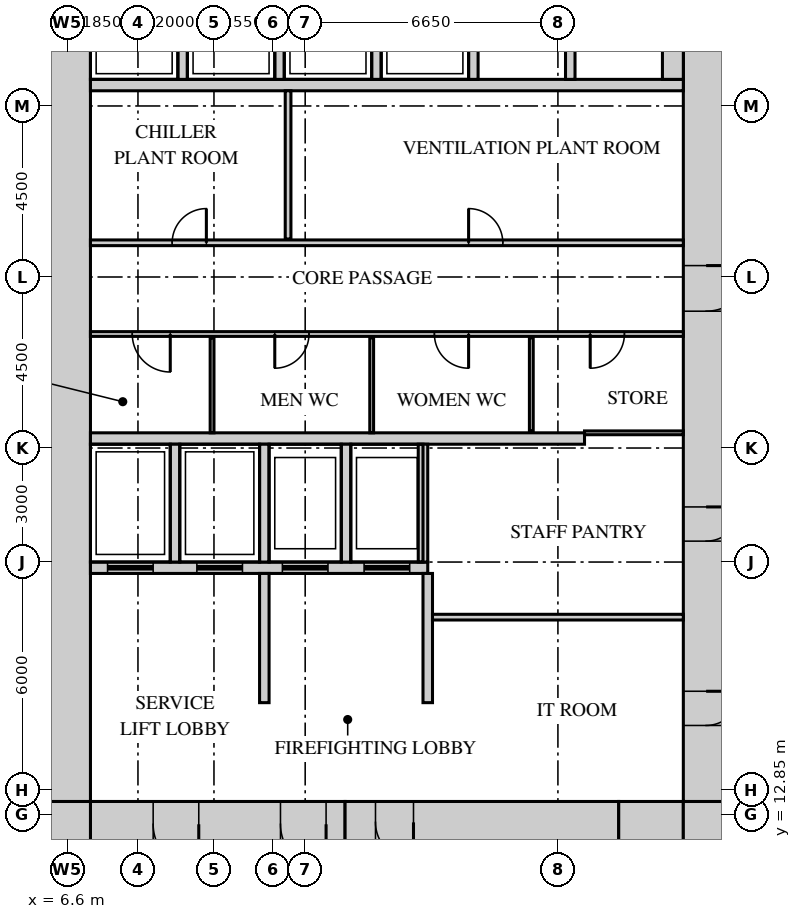
"""IFC4 building model, lengths in metres.
Left out: names, types, materials, properties, quantities, classifications, styles, units other than length and angle.
Written with IfcOpenShell. Run it as: python <this file> out.ifc"""

import sys

from ifc_helpers import new_model, si_unit, direction, frame, frame_2d, origin, place, context, subcontext, project, spatial, rectangle, extrude, source, transform, mapped, element, fill, save


model = new_model("IFC4")
c1 = context("Model", 3, precision=1e-05, world=origin(), true_north=direction((0.0, 1.0)))
c2 = subcontext(c1, "Body", "Model", "MODEL_VIEW")
j1 = project(units=[si_unit("LENGTHUNIT", "METRE"), si_unit("PLANEANGLEUNIT", "RADIAN")], contexts=[c1])
p1 = place(None, origin())
s1 = spatial("IfcSite", under=j1, at=p1, CompositionType="ELEMENT")
p2 = place(p1, origin())
s2 = spatial("IfcBuilding", under=s1, at=p2, CompositionType="ELEMENT")
p3 = place(p2, frame((0.0, 0.0, 23.5)))
s3 = spatial("IfcBuildingStorey", under=s2, at=p3, CompositionType="ELEMENT", Elevation=23.5)
m1 = source(origin(), c2, "Body", "SweptSolid", [
    extrude(rectangle(XDim=6.7, YDim=1.2, at=frame_2d((3.35, 0.0))), origin(), (0.0, 0.0, 1.0), 4.7),
])
p4 = place(p3, frame((7.2, 12.6, 0.0), z_axis=(0.0, 0.0, 1.0), x_axis=(1.0, 0.0, 0.0)))
e1 = element("IfcWall", 1, at=p4, inside=s3, PredefinedType="SHEAR", context=c2, shape_type="MappedRepresentation", body=[
    mapped(m1, transform((0.0, 0.0, 0.0))),
])
m2 = source(origin(), c2, "Body", "SweptSolid", [
    extrude(rectangle(XDim=1.2, YDim=2.1, at=frame_2d((0.6, 1.05))), frame((0.0, 0.61, 0.0), z_axis=(0.0, -1.0, 0.0), x_axis=(1.0, 0.0, 0.0)), (0.0, 0.0, 1.0), 1.22),
])
p5 = place(p4, frame((5.0, 0.0, 0.0)))
e2 = element("IfcOpeningElement", 2, at=p5, cuts=e1, PredefinedType="OPENING", context=c2, shape_type="MappedRepresentation", body=[
    mapped(m2, transform((0.0, 0.0, 0.0))),
])
p6 = place(p4, frame((1.65, 0.0, 0.0)))
e3 = element("IfcOpeningElement", 3, at=p6, cuts=e1, PredefinedType="OPENING", context=c2, shape_type="MappedRepresentation", body=[
    mapped(m2, transform((0.0, 0.0, 0.0))),
])
m3 = source(origin(), c2, "Body", "SweptSolid", [
    extrude(rectangle(XDim=7.2, YDim=1.1, at=frame_2d((3.6, 0.0))), origin(), (0.0, 0.0, 1.0), 4.7),
])
p7 = place(p3, frame((13.9, 12.65, 0.0), z_axis=(0.0, 0.0, 1.0), x_axis=(1.0, 0.0, 0.0)))
e4 = element("IfcWall", 4, at=p7, inside=s3, PredefinedType="SHEAR", context=c2, shape_type="MappedRepresentation", body=[
    mapped(m3, transform((0.0, 0.0, 0.0))),
])
m4 = source(origin(), c2, "Body", "SweptSolid", [
    extrude(rectangle(XDim=1.0, YDim=2.1, at=frame_2d((0.5, 1.05))), frame((0.0, 0.56, 0.0), z_axis=(0.0, -1.0, 0.0), x_axis=(1.0, 0.0, 0.0)), (0.0, 0.0, 1.0), 1.12),
])
p8 = place(p7, frame((0.8, 0.0, 0.0)))
e5 = element("IfcOpeningElement", 5, at=p8, cuts=e4, PredefinedType="OPENING", context=c2, shape_type="MappedRepresentation", body=[
    mapped(m4, transform((0.0, 0.0, 0.0))),
])
m5 = source(origin(), c2, "Body", "SweptSolid", [
    extrude(rectangle(XDim=1.7, YDim=1.2, at=frame_2d((0.85, 0.0))), origin(), (0.0, 0.0, 1.0), 4.7),
])
p9 = place(p3, frame((21.1, 12.6, 0.0), z_axis=(0.0, 0.0, 1.0), x_axis=(1.0, 0.0, 0.0)))
e6 = element("IfcWall", 6, at=p9, inside=s3, PredefinedType="SHEAR", context=c2, shape_type="MappedRepresentation", body=[
    mapped(m5, transform((0.0, 0.0, 0.0))),
])
m6 = source(origin(), c2, "Body", "SweptSolid", [
    extrude(rectangle(XDim=1.2, YDim=1.2, at=frame_2d((0.6, 0.0))), origin(), (0.0, 0.0, 1.0), 4.7),
])
for number, where, z_axis, x_axis in (
    (7, (22.8, 12.6, 0.0), (0.0, 0.0, 1.0), (1.0, 0.0, 0.0)),
    (8, (6.0, 12.6, 0.0), (0.0, 0.0, 1.0), (1.0, 0.0, 0.0)),
):
    element("IfcWall", number, at=place(p3, frame(where, z_axis=z_axis, x_axis=x_axis)), inside=s3, PredefinedType="SHEAR", context=c2, shape_type="MappedRepresentation", body=[
        mapped(m6, transform((0.0, 0.0, 0.0))),
    ])
m7 = source(origin(), c2, "Body", "SweptSolid", [
    extrude(rectangle(XDim=27.6, YDim=1.2, at=frame_2d((13.8, 0.0))), origin(), (0.0, 0.0, 1.0), 4.7),
])
p10 = place(p3, frame((23.4, 13.2, 0.0), z_axis=(0.0, 0.0, 1.0), x_axis=(0.0, 1.0, 0.0)))
e9 = element("IfcWall", 9, at=p10, inside=s3, PredefinedType="SHEAR", context=c2, shape_type="MappedRepresentation", body=[
    mapped(m7, transform((0.0, 0.0, 0.0))),
])
m8 = source(origin(), c2, "Body", "SweptSolid", [
    extrude(rectangle(XDim=1.8, YDim=2.1, at=frame_2d((0.9, 1.05))), frame((0.0, 0.61, 0.0), z_axis=(0.0, -1.0, 0.0), x_axis=(1.0, 0.0, 0.0)), (0.0, 0.0, 1.0), 1.22),
])
p11 = place(p10, frame((22.4, 0.0, 0.0)))
e10 = element("IfcOpeningElement", 10, at=p11, cuts=e9, PredefinedType="OPENING", context=c2, shape_type="MappedRepresentation", body=[
    mapped(m8, transform((0.0, 0.0, 0.0))),
])
p12 = place(p10, frame((12.9, 0.0, 0.0)))
e11 = element("IfcOpeningElement", 11, at=p12, cuts=e9, PredefinedType="OPENING", context=c2, shape_type="MappedRepresentation", body=[
    mapped(m2, transform((0.0, 0.0, 0.0))),
])
m9 = source(origin(), c2, "Body", "SweptSolid", [
    extrude(rectangle(XDim=0.9, YDim=2.1, at=frame_2d((0.45, 1.05))), frame((0.0, 0.61, 0.0), z_axis=(0.0, -1.0, 0.0), x_axis=(1.0, 0.0, 0.0)), (0.0, 0.0, 1.0), 1.22),
])
p13 = place(p10, frame((2.0, 0.0, 0.0)))
e12 = element("IfcOpeningElement", 12, at=p13, cuts=e9, PredefinedType="OPENING", context=c2, shape_type="MappedRepresentation", body=[
    mapped(m9, transform((0.0, 0.0, 0.0))),
])
p14 = place(p10, frame((6.85, 0.0, 0.0)))
e13 = element("IfcOpeningElement", 13, at=p14, cuts=e9, PredefinedType="OPENING", context=c2, shape_type="MappedRepresentation", body=[
    mapped(m9, transform((0.0, 0.0, 0.0))),
])
p15 = place(p3, frame((6.6, 13.2, 0.0), z_axis=(0.0, 0.0, 1.0), x_axis=(0.0, 1.0, 0.0)))
e14 = element("IfcWall", 14, at=p15, inside=s3, PredefinedType="SHEAR", context=c2, shape_type="MappedRepresentation", body=[
    mapped(m7, transform((0.0, 0.0, 0.0))),
])
m10 = source(origin(), c2, "Body", "SweptSolid", [
    extrude(rectangle(XDim=13.0, YDim=0.3, at=frame_2d((6.5, 0.0))), origin(), (0.0, 0.0, 1.0), 4.7),
])
p16 = place(p3, frame((7.2, 22.75, 0.0), z_axis=(0.0, 0.0, 1.0), x_axis=(1.0, 0.0, 0.0)))
e15 = element("IfcWall", 15, at=p16, inside=s3, PredefinedType="STANDARD", context=c2, shape_type="MappedRepresentation", body=[
    mapped(m10, transform((0.0, 0.0, 0.0))),
])
m11 = source(origin(), c2, "Body", "SweptSolid", [
    extrude(rectangle(XDim=8.875, YDim=0.3, at=frame_2d((4.438, 0.0))), origin(), (0.0, 0.0, 1.0), 4.7),
])
p17 = place(p3, frame((7.2, 19.35, 0.0), z_axis=(0.0, 0.0, 1.0), x_axis=(1.0, 0.0, 0.0)))
e16 = element("IfcWall", 16, at=p17, inside=s3, PredefinedType="STANDARD", context=c2, shape_type="MappedRepresentation", body=[
    mapped(m11, transform((0.0, 0.0, 0.0))),
])
m12 = source(origin(), c2, "Body", "SweptSolid", [
    extrude(rectangle(XDim=1.2, YDim=2.1, at=frame_2d((0.6, 1.05))), frame((0.0, 0.16, 0.0), z_axis=(0.0, -1.0, 0.0), x_axis=(1.0, 0.0, 0.0)), (0.0, 0.0, 1.0), 0.32),
])
p18 = place(p17, frame((0.45, 0.0, 0.0)))
e17 = element("IfcOpeningElement", 17, at=p18, cuts=e16, PredefinedType="OPENING", context=c2, shape_type="MappedRepresentation", body=[
    mapped(m12, transform((0.0, 0.0, 0.0))),
])
p19 = place(p17, frame((2.8, 0.0, 0.0)))
e18 = element("IfcOpeningElement", 18, at=p19, cuts=e16, PredefinedType="OPENING", context=c2, shape_type="MappedRepresentation", body=[
    mapped(m12, transform((0.0, 0.0, 0.0))),
])
p20 = place(p17, frame((5.05, 0.0, 0.0)))
e19 = element("IfcOpeningElement", 19, at=p20, cuts=e16, PredefinedType="OPENING", context=c2, shape_type="MappedRepresentation", body=[
    mapped(m12, transform((0.0, 0.0, 0.0))),
])
p21 = place(p17, frame((7.2, 0.0, 0.0)))
e20 = element("IfcOpeningElement", 20, at=p21, cuts=e16, PredefinedType="OPENING", context=c2, shape_type="MappedRepresentation", body=[
    mapped(m12, transform((0.0, 0.0, 0.0))),
])
m13 = source(origin(), c2, "Body", "SweptSolid", [
    extrude(rectangle(XDim=15.6, YDim=0.3, at=frame_2d((7.8, 0.0))), origin(), (0.0, 0.0, 1.0), 4.7),
])
p22 = place(p3, frame((7.2, 32.05, 0.0), z_axis=(0.0, 0.0, 1.0), x_axis=(1.0, 0.0, 0.0)))
e21 = element("IfcWall", 21, at=p22, inside=s3, PredefinedType="STANDARD", context=c2, shape_type="MappedRepresentation", body=[
    mapped(m13, transform((0.0, 0.0, 0.0))),
])
m14 = source(origin(), c2, "Body", "SweptSolid", [
    extrude(rectangle(XDim=3.1, YDim=0.25, at=frame_2d((1.55, 0.0))), origin(), (0.0, 0.0, 1.0), 4.7),
])
for number, where, z_axis, x_axis in (
    (22, (9.425, 19.5, 0.0), (0.0, 0.0, 1.0), (0.0, 1.0, 0.0)),
    (23, (11.775, 19.5, 0.0), (0.0, 0.0, 1.0), (0.0, 1.0, 0.0)),
    (24, (13.925, 19.5, 0.0), (0.0, 0.0, 1.0), (0.0, 1.0, 0.0)),
    (25, (15.95, 19.5, 0.0), (0.0, 0.0, 1.0), (0.0, 1.0, 0.0)),
):
    element("IfcWall", number, at=place(p3, frame(where, z_axis=z_axis, x_axis=x_axis)), inside=s3, PredefinedType="STANDARD", context=c2, shape_type="MappedRepresentation", body=[
        mapped(m14, transform((0.0, 0.0, 0.0))),
    ])
m15 = source(origin(), c2, "Body", "SweptSolid", [
    extrude(rectangle(XDim=2.4, YDim=0.25, at=frame_2d((1.2, 0.0))), origin(), (0.0, 0.0, 1.0), 4.7),
])
for number, where, z_axis, x_axis in (
    (26, (9.625, 32.2, 0.0), (0.0, 0.0, 1.0), (0.0, 1.0, 0.0)),
    (27, (12.175, 32.2, 0.0), (0.0, 0.0, 1.0), (0.0, 1.0, 0.0)),
    (28, (14.725, 32.2, 0.0), (0.0, 0.0, 1.0), (0.0, 1.0, 0.0)),
    (29, (17.275, 32.2, 0.0), (0.0, 0.0, 1.0), (0.0, 1.0, 0.0)),
    (30, (19.825, 32.2, 0.0), (0.0, 0.0, 1.0), (0.0, 1.0, 0.0)),
):
    element("IfcWall", number, at=place(p3, frame(where, z_axis=z_axis, x_axis=x_axis)), inside=s3, PredefinedType="STANDARD", context=c2, shape_type="MappedRepresentation", body=[
        mapped(m15, transform((0.0, 0.0, 0.0))),
    ])
m16 = source(origin(), c2, "Body", "SweptSolid", [
    extrude(rectangle(XDim=2.4, YDim=0.55, at=frame_2d((1.2, 0.0))), origin(), (0.0, 0.0, 1.0), 4.7),
])
p23 = place(p3, frame((22.525, 32.2, 0.0), z_axis=(0.0, 0.0, 1.0), x_axis=(0.0, 1.0, 0.0)))
e31 = element("IfcWall", 31, at=p23, inside=s3, PredefinedType="STANDARD", context=c2, shape_type="MappedRepresentation", body=[
    mapped(m16, transform((0.0, 0.0, 0.0))),
])
m17 = source(origin(), c2, "Body", "SweptSolid", [
    extrude(rectangle(XDim=3.4, YDim=0.25, at=frame_2d((1.7, 0.0))), origin(), (0.0, 0.0, 1.0), 4.7),
])
for number, where, z_axis, x_axis in (
    (32, (16.075, 15.8, 0.0), (0.0, 0.0, 1.0), (0.0, 1.0, 0.0)),
    (33, (11.775, 15.8, 0.0), (0.0, 0.0, 1.0), (0.0, 1.0, 0.0)),
):
    element("IfcWall", number, at=place(p3, frame(where, z_axis=z_axis, x_axis=x_axis)), inside=s3, PredefinedType="STANDARD", context=c2, shape_type="MappedRepresentation", body=[
        mapped(m17, transform((0.0, 0.0, 0.0))),
    ])
m18 = source(origin(), c2, "Body", "SweptSolid", [
    extrude(rectangle(XDim=6.6, YDim=0.15, at=frame_2d((3.3, 0.0))), origin(), (0.0, 0.0, 1.0), 4.7),
])
p24 = place(p3, frame((16.2, 18.05, 0.0), z_axis=(0.0, 0.0, 1.0), x_axis=(1.0, 0.0, 0.0)))
e34 = element("IfcWall", 34, at=p24, inside=s3, PredefinedType="PARTITIONING", context=c2, shape_type="MappedRepresentation", body=[
    mapped(m18, transform((0.0, 0.0, 0.0))),
])
m19 = source(origin(), c2, "Body", "SweptSolid", [
    extrude(rectangle(XDim=2.5, YDim=0.1, at=frame_2d((1.25, 0.0))), origin(), (0.0, 0.0, 1.0), 4.7),
])
for number, where, z_axis, x_axis in (
    (35, (10.4, 22.9, 0.0), (0.0, 0.0, 1.0), (0.0, 1.0, 0.0)),
    (36, (14.6, 22.9, 0.0), (0.0, 0.0, 1.0), (0.0, 1.0, 0.0)),
):
    element("IfcWall", number, at=place(p3, frame(where, z_axis=z_axis, x_axis=x_axis)), inside=s3, PredefinedType="PARTITIONING", context=c2, shape_type="MappedRepresentation", body=[
        mapped(m19, transform((0.0, 0.0, 0.0))),
    ])
m20 = source(origin(), c2, "Body", "SweptSolid", [
    extrude(rectangle(XDim=2.6, YDim=0.1, at=frame_2d((1.3, 0.0))), origin(), (0.0, 0.0, 1.0), 4.7),
])
p25 = place(p3, frame((20.2, 22.9, 0.0), z_axis=(0.0, 0.0, 1.0), x_axis=(1.0, 0.0, 0.0)))
e37 = element("IfcWall", 37, at=p25, inside=s3, PredefinedType="PARTITIONING", context=c2, shape_type="MappedRepresentation", body=[
    mapped(m20, transform((0.0, 0.0, 0.0))),
])
m21 = source(origin(), c2, "Body", "SweptSolid", [
    extrude(rectangle(XDim=2.45, YDim=0.1, at=frame_2d((1.225, 0.0))), origin(), (0.0, 0.0, 1.0), 4.7),
])
p26 = place(p3, frame((18.8, 22.95, 0.0), z_axis=(0.0, 0.0, 1.0), x_axis=(0.0, 1.0, 0.0)))
e38 = element("IfcWall", 38, at=p26, inside=s3, PredefinedType="PARTITIONING", context=c2, shape_type="MappedRepresentation", body=[
    mapped(m21, transform((0.0, 0.0, 0.0))),
])
m22 = source(origin(), c2, "Body", "SweptSolid", [
    extrude(rectangle(XDim=15.6, YDim=0.125, at=frame_2d((7.8, 0.0))), origin(), (0.0, 0.0, 1.0), 4.7),
])
p27 = place(p3, frame((7.2, 25.5, 0.0), z_axis=(0.0, 0.0, 1.0), x_axis=(1.0, 0.0, 0.0)))
e39 = element("IfcWall", 39, at=p27, inside=s3, PredefinedType="PARTITIONING", context=c2, shape_type="MappedRepresentation", body=[
    mapped(m22, transform((0.0, 0.0, 0.0))),
])
m23 = source(origin(), c2, "Body", "SweptSolid", [
    extrude(rectangle(XDim=1.0, YDim=2.1, at=frame_2d((0.5, 1.05))), frame((0.0, 0.073, 0.0), z_axis=(0.0, -1.0, 0.0), x_axis=(1.0, 0.0, 0.0)), (0.0, 0.0, 1.0), 0.145),
])
p28 = place(p27, frame((1.1, 0.0, 0.0)))
e40 = element("IfcOpeningElement", 40, at=p28, cuts=e39, PredefinedType="OPENING", context=c2, shape_type="MappedRepresentation", body=[
    mapped(m23, transform((0.0, 0.0, 0.0))),
])
m24 = source(origin(), c2, "Body", "SweptSolid", [
    extrude(rectangle(XDim=0.9, YDim=2.1, at=frame_2d((0.45, 1.05))), frame((0.0, 0.073, 0.0), z_axis=(0.0, -1.0, 0.0), x_axis=(1.0, 0.0, 0.0)), (0.0, 0.0, 1.0), 0.145),
])
p29 = place(p27, frame((4.85, 0.0, 0.0)))
e41 = element("IfcOpeningElement", 41, at=p29, cuts=e39, PredefinedType="OPENING", context=c2, shape_type="MappedRepresentation", body=[
    mapped(m24, transform((0.0, 0.0, 0.0))),
])
p30 = place(p27, frame((9.05, 0.0, 0.0)))
e42 = element("IfcOpeningElement", 42, at=p30, cuts=e39, PredefinedType="OPENING", context=c2, shape_type="MappedRepresentation", body=[
    mapped(m24, transform((0.0, 0.0, 0.0))),
])
p31 = place(p27, frame((13.15, 0.0, 0.0)))
e43 = element("IfcOpeningElement", 43, at=p31, cuts=e39, PredefinedType="OPENING", context=c2, shape_type="MappedRepresentation", body=[
    mapped(m24, transform((0.0, 0.0, 0.0))),
])
m25 = source(origin(), c2, "Body", "SweptSolid", [
    extrude(rectangle(XDim=15.6, YDim=0.15, at=frame_2d((7.8, 0.0))), origin(), (0.0, 0.0, 1.0), 4.7),
])
p32 = place(p3, frame((7.2, 27.9, 0.0), z_axis=(0.0, 0.0, 1.0), x_axis=(1.0, 0.0, 0.0)))
e44 = element("IfcWall", 44, at=p32, inside=s3, PredefinedType="PARTITIONING", context=c2, shape_type="MappedRepresentation", body=[
    mapped(m25, transform((0.0, 0.0, 0.0))),
])
m26 = source(origin(), c2, "Body", "SweptSolid", [
    extrude(rectangle(XDim=0.9, YDim=2.1, at=frame_2d((0.45, 1.05))), frame((0.0, 0.085, 0.0), z_axis=(0.0, -1.0, 0.0), x_axis=(1.0, 0.0, 0.0)), (0.0, 0.0, 1.0), 0.17),
])
p33 = place(p32, frame((2.15, 0.0, 0.0)))
e45 = element("IfcOpeningElement", 45, at=p33, cuts=e44, PredefinedType="OPENING", context=c2, shape_type="MappedRepresentation", body=[
    mapped(m26, transform((0.0, 0.0, 0.0))),
])
p34 = place(p32, frame((9.95, 0.0, 0.0)))
e46 = element("IfcOpeningElement", 46, at=p34, cuts=e44, PredefinedType="OPENING", context=c2, shape_type="MappedRepresentation", body=[
    mapped(m26, transform((0.0, 0.0, 0.0))),
])
m27 = source(origin(), c2, "Body", "SweptSolid", [
    extrude(rectangle(XDim=3.9, YDim=0.15, at=frame_2d((1.95, 0.0))), origin(), (0.0, 0.0, 1.0), 4.7),
])
p35 = place(p3, frame((12.4, 28.0, 0.0), z_axis=(0.0, 0.0, 1.0), x_axis=(0.0, 1.0, 0.0)))
e47 = element("IfcWall", 47, at=p35, inside=s3, PredefinedType="PARTITIONING", context=c2, shape_type="MappedRepresentation", body=[
    mapped(m27, transform((0.0, 0.0, 0.0))),
])
m28 = source(origin(), c2, "Body", "SweptSolid", [
    extrude(rectangle(XDim=1.2, YDim=2.1, at=frame_2d((0.6, 1.05))), frame((0.0, 0.55, 0.0), z_axis=(0.0, -1.0, 0.0), x_axis=(1.0, 0.0, 0.0)), (0.0, 0.0, 1.0), 1.1),
])
p36 = place(p12, origin())
e48 = element("IfcDoor", 48, at=p36, inside=s3, OperationType="SINGLE_SWING_RIGHT", PredefinedType="DOOR", context=c2, shape_type="MappedRepresentation", body=[
    mapped(m28, transform((0.0, 0.0, 0.0))),
])
fill(e11, e48)
m29 = source(origin(), c2, "Body", "SweptSolid", [
    extrude(rectangle(XDim=0.9, YDim=2.1, at=frame_2d((0.45, 1.05))), frame((0.0, 0.025, 0.0), z_axis=(0.0, -1.0, 0.0), x_axis=(1.0, 0.0, 0.0)), (0.0, 0.0, 1.0), 0.05),
])
p37 = place(p33, origin())
e49 = element("IfcDoor", 49, at=p37, inside=s3, OperationType="SINGLE_SWING_LEFT", PredefinedType="DOOR", context=c2, shape_type="MappedRepresentation", body=[
    mapped(m29, transform((0.0, 0.0, 0.0))),
])
fill(e45, e49)
p38 = place(p34, origin())
e50 = element("IfcDoor", 50, at=p38, inside=s3, OperationType="SINGLE_SWING_RIGHT", PredefinedType="DOOR", context=c2, shape_type="MappedRepresentation", body=[
    mapped(m29, transform((0.0, 0.0, 0.0))),
])
fill(e46, e50)
m30 = source(origin(), c2, "Body", "SweptSolid", [
    extrude(rectangle(XDim=1.0, YDim=2.1, at=frame_2d((0.5, 1.05))), frame((0.0, 0.025, 0.0), z_axis=(0.0, -1.0, 0.0), x_axis=(1.0, 0.0, 0.0)), (0.0, 0.0, 1.0), 0.05),
])
p39 = place(p28, origin())
e51 = element("IfcDoor", 51, at=p39, inside=s3, OperationType="SINGLE_SWING_RIGHT", PredefinedType="DOOR", context=c2, shape_type="MappedRepresentation", body=[
    mapped(m30, transform((0.0, 0.0, 0.0))),
])
fill(e40, e51)
p40 = place(p29, origin())
e52 = element("IfcDoor", 52, at=p40, inside=s3, OperationType="SINGLE_SWING_LEFT", PredefinedType="DOOR", context=c2, shape_type="MappedRepresentation", body=[
    mapped(m29, transform((0.0, 0.0, 0.0))),
])
fill(e41, e52)
p41 = place(p30, origin())
e53 = element("IfcDoor", 53, at=p41, inside=s3, OperationType="SINGLE_SWING_RIGHT", PredefinedType="DOOR", context=c2, shape_type="MappedRepresentation", body=[
    mapped(m29, transform((0.0, 0.0, 0.0))),
])
fill(e42, e53)
p42 = place(p31, origin())
e54 = element("IfcDoor", 54, at=p42, inside=s3, OperationType="SINGLE_SWING_LEFT", PredefinedType="DOOR", context=c2, shape_type="MappedRepresentation", body=[
    mapped(m29, transform((0.0, 0.0, 0.0))),
])
fill(e43, e54)
m31 = source(origin(), c2, "Body", "SweptSolid", [
    extrude(rectangle(XDim=0.9, YDim=2.1, at=frame_2d((0.45, 1.05))), frame((0.0, 0.55, 0.0), z_axis=(0.0, -1.0, 0.0), x_axis=(1.0, 0.0, 0.0)), (0.0, 0.0, 1.0), 1.1),
])
p43 = place(p13, origin())
e55 = element("IfcDoor", 55, at=p43, inside=s3, OperationType="SINGLE_SWING_RIGHT", PredefinedType="DOOR", context=c2, shape_type="MappedRepresentation", body=[
    mapped(m31, transform((0.0, 0.0, 0.0))),
])
fill(e12, e55)
p44 = place(p14, origin())
e56 = element("IfcDoor", 56, at=p44, inside=s3, OperationType="SINGLE_SWING_RIGHT", PredefinedType="DOOR", context=c2, shape_type="MappedRepresentation", body=[
    mapped(m31, transform((0.0, 0.0, 0.0))),
])
fill(e13, e56)
p45 = place(p5, origin())
e57 = element("IfcDoor", 57, at=p45, inside=s3, OperationType="SINGLE_SWING_RIGHT", PredefinedType="DOOR", context=c2, shape_type="MappedRepresentation", body=[
    mapped(m28, transform((0.0, 0.0, 0.0))),
])
fill(e2, e57)
p46 = place(p6, origin())
e58 = element("IfcDoor", 58, at=p46, inside=s3, OperationType="SINGLE_SWING_RIGHT", PredefinedType="DOOR", context=c2, shape_type="MappedRepresentation", body=[
    mapped(m28, transform((0.0, 0.0, 0.0))),
])
fill(e3, e58)
m32 = source(origin(), c2, "Body", "SweptSolid", [
    extrude(rectangle(XDim=1.0, YDim=2.1, at=frame_2d((0.5, 1.05))), frame((0.0, 0.5, 0.0), z_axis=(0.0, -1.0, 0.0), x_axis=(1.0, 0.0, 0.0)), (0.0, 0.0, 1.0), 1.0),
])
p47 = place(p8, origin())
e59 = element("IfcDoor", 59, at=p47, inside=s3, OperationType="SINGLE_SWING_RIGHT", PredefinedType="DOOR", context=c2, shape_type="MappedRepresentation", body=[
    mapped(m32, transform((0.0, 0.0, 0.0))),
])
fill(e5, e59)
m33 = source(origin(), c2, "Body", "SweptSolid", [
    extrude(rectangle(XDim=1.2, YDim=2.1, at=frame_2d((0.6, 1.05))), frame((0.0, 0.025, 0.0), z_axis=(0.0, -1.0, 0.0), x_axis=(1.0, 0.0, 0.0)), (0.0, 0.0, 1.0), 0.05),
])
p48 = place(p18, origin())
e60 = element("IfcDoor", 60, at=p48, inside=s3, OperationType="DOUBLE_DOOR_SLIDING", PredefinedType="DOOR", context=c2, shape_type="MappedRepresentation", body=[
    mapped(m33, transform((0.0, 0.0, 0.0))),
])
fill(e17, e60)
p49 = place(p19, origin())
e61 = element("IfcDoor", 61, at=p49, inside=s3, OperationType="DOUBLE_DOOR_SLIDING", PredefinedType="DOOR", context=c2, shape_type="MappedRepresentation", body=[
    mapped(m33, transform((0.0, 0.0, 0.0))),
])
fill(e18, e61)
p50 = place(p20, origin())
e62 = element("IfcDoor", 62, at=p50, inside=s3, OperationType="DOUBLE_DOOR_SLIDING", PredefinedType="DOOR", context=c2, shape_type="MappedRepresentation", body=[
    mapped(m33, transform((0.0, 0.0, 0.0))),
])
fill(e19, e62)
p51 = place(p21, origin())
e63 = element("IfcDoor", 63, at=p51, inside=s3, OperationType="DOUBLE_DOOR_SLIDING", PredefinedType="DOOR", context=c2, shape_type="MappedRepresentation", body=[
    mapped(m33, transform((0.0, 0.0, 0.0))),
])
fill(e20, e63)
save(model, sys.argv[1])
